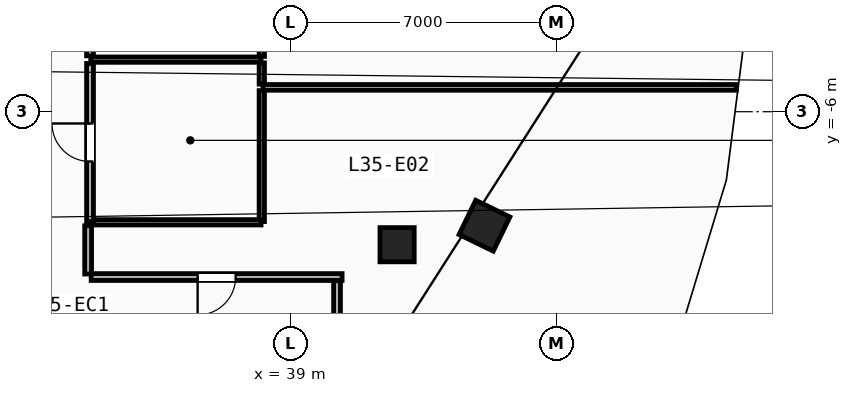
"""IFC4 building model, lengths in metres.
Left out: names, types, materials, properties, quantities, classifications, styles, units other than length and angle.
Written with IfcOpenShell. Run it as: python <this file> out.ifc"""

import sys

from ifc_helpers import new_model, si_unit, direction, frame, frame_2d, origin, origin_2d, place, context, subcontext, project, spatial, rectangle, extrude, element, fill, save


model = new_model("IFC4")
c1 = context("Model", 3, precision=1e-05, world=origin(), true_north=direction((0.0, 1.0)))
c2 = subcontext(c1, "Body", "Model", "MODEL_VIEW")
j1 = project(units=[si_unit("LENGTHUNIT", "METRE"), si_unit("PLANEANGLEUNIT", "RADIAN")], contexts=[c1])
p1 = place(None, origin())
s1 = spatial("IfcSite", under=j1, at=p1, CompositionType="ELEMENT")
p2 = place(p1, origin())
s2 = spatial("IfcBuilding", under=s1, at=p2, CompositionType="ELEMENT")
p3 = place(p2, frame((0.0, 0.0, 136.8)))
s3 = spatial("IfcBuildingStorey", under=s2, at=p3, CompositionType="ELEMENT", Elevation=136.8)
p4 = place(p3, frame((41.8, -9.5, 0.0), z_axis=(0.0, 0.0, 1.0), x_axis=(1.0, 0.0, 0.0)))
e1 = element("IfcColumn", 1, at=p4, inside=s3, PredefinedType="COLUMN", context=c2, shape_type="SweptSolid", body=[
    extrude(rectangle(XDim=0.9, YDim=0.9, at=origin_2d()), origin(), (0.0, 0.0, 1.0), 3.6),
])
p5 = place(p3, frame((44.1, -9.0, 0.0), z_axis=(0.0, 0.0, 1.0), x_axis=(0.437115766651, 0.899405251566, 0.0)))
e2 = element("IfcColumn", 2, at=p5, inside=s3, PredefinedType="COLUMN", context=c2, shape_type="SweptSolid", body=[
    extrude(rectangle(XDim=1.0, YDim=1.0, at=origin_2d()), origin(), (0.0, 0.0, 1.0), 3.6),
])
p6 = place(p3, frame((38.24, -8.89, 0.0), z_axis=(0.0, 0.0, 1.0), x_axis=(0.0, 1.0, 0.0)))
e3 = element("IfcWall", 3, at=p6, inside=s3, PredefinedType="PARTITIONING", context=c2, shape_type="SweptSolid", body=[
    extrude(rectangle(XDim=3.445, YDim=0.14, at=frame_2d((1.722, 0.0))), origin(), (0.0, 0.0, 1.0), 3.36),
])
p7 = place(p3, frame((38.24, -5.275, 0.0), z_axis=(0.0, 0.0, 1.0), x_axis=(0.0, 1.0, 0.0)))
e4 = element("IfcWall", 4, at=p7, inside=s3, PredefinedType="PARTITIONING", context=c2, shape_type="SweptSolid", body=[
    extrude(rectangle(XDim=0.56, YDim=0.14, at=frame_2d((0.28, 0.0))), origin(), (0.0, 0.0, 1.0), 3.36),
])
p8 = place(p3, frame((38.24, -4.545, 0.0), z_axis=(0.0, 0.0, 1.0), x_axis=(0.0, 1.0, 0.0)))
e5 = element("IfcWall", 5, at=p8, inside=s3, PredefinedType="PARTITIONING", context=c2, shape_type="SweptSolid", body=[
    extrude(rectangle(XDim=4.275, YDim=0.14, at=frame_2d((2.137, 0.0))), origin(), (0.0, 0.0, 1.0), 3.36),
])
for number, where, z_axis, x_axis in (
    (6, (33.74, -4.63, 0.0), (0.0, 0.0, 1.0), (1.0, 0.0, 0.0)),
    (7, (33.74, -8.91, 0.0), (0.0, 0.0, 1.0), (1.0, 0.0, 0.0)),
):
    element("IfcWall", number, at=place(p3, frame(where, z_axis=z_axis, x_axis=x_axis)), inside=s3, PredefinedType="PARTITIONING", context=c2, shape_type="SweptSolid", body=[
        extrude(rectangle(XDim=4.48, YDim=0.14, at=frame_2d((2.24, 0.0))), origin(), (0.0, 0.0, 1.0), 3.36),
    ])
p9 = place(p3, frame((33.72, -4.53, 0.0), z_axis=(0.0, 0.0, 1.0), x_axis=(0.0, 1.0, 0.0)))
e8 = element("IfcWall", 8, at=p9, inside=s3, PredefinedType="PARTITIONING", context=c2, shape_type="SweptSolid", body=[
    extrude(rectangle(XDim=4.26, YDim=0.18, at=frame_2d((2.13, 0.0))), origin(), (0.0, 0.0, 1.0), 3.36),
])
p10 = place(p9, frame((1.655, 0.0, 0.0)))
e9 = element("IfcOpeningElement", 9, at=p10, cuts=e8, PredefinedType="OPENING", context=c2, shape_type="SweptSolid", body=[
    extrude(rectangle(XDim=0.95, YDim=2.1, at=frame_2d((0.475, 1.05))), frame((0.0, 0.1, 0.0), z_axis=(0.0, -1.0, 0.0), x_axis=(1.0, 0.0, 0.0)), (0.0, 0.0, 1.0), 0.2),
])
p11 = place(p3, frame((33.72, -8.89, 0.0), z_axis=(0.0, 0.0, 1.0), x_axis=(0.0, 1.0, 0.0)))
e10 = element("IfcWall", 10, at=p11, inside=s3, PredefinedType="PARTITIONING", context=c2, shape_type="SweptSolid", body=[
    extrude(rectangle(XDim=4.16, YDim=0.18, at=frame_2d((2.08, 0.0))), origin(), (0.0, 0.0, 1.0), 3.36),
])
p12 = place(p11, frame((1.58, 0.0, 0.0)))
e11 = element("IfcOpeningElement", 11, at=p12, cuts=e10, PredefinedType="OPENING", context=c2, shape_type="SweptSolid", body=[
    extrude(rectangle(XDim=1.0, YDim=2.15, at=frame_2d((0.5, 1.075))), frame((0.0, 0.1, 0.0), z_axis=(0.0, -1.0, 0.0), x_axis=(1.0, 0.0, 0.0)), (0.0, 0.0, 1.0), 0.2),
])
p13 = place(p3, frame((38.27, -5.36, 0.0), z_axis=(0.0, 0.0, 1.0), x_axis=(1.0, 0.0, 0.0)))
e12 = element("IfcWall", 12, at=p13, inside=s3, PredefinedType="PARTITIONING", context=c2, shape_type="SweptSolid", body=[
    extrude(rectangle(XDim=12.455, YDim=0.15, at=frame_2d((6.228, 0.0))), origin(), (0.0, 0.0, 1.0), 3.36),
])
p14 = place(p3, frame((40.22, -12.779, 0.0), z_axis=(0.0, 0.0, 1.0), x_axis=(0.0, 1.0, 0.0)))
e13 = element("IfcWall", 13, at=p14, inside=s3, PredefinedType="PARTITIONING", context=c2, shape_type="SweptSolid", body=[
    extrude(rectangle(XDim=2.329, YDim=0.18, at=frame_2d((1.164, 0.0))), origin(), (0.0, 0.0, 1.0), 3.36),
])
p15 = place(p3, frame((40.353, -10.35, 0.0), z_axis=(0.0, 0.0, 1.0), x_axis=(-1.0, 0.0, 0.0)))
e14 = element("IfcWall", 14, at=p15, inside=s3, PredefinedType="PARTITIONING", context=c2, shape_type="SweptSolid", body=[
    extrude(rectangle(XDim=6.603, YDim=0.18, at=frame_2d((3.301, 0.0))), origin(), (0.0, 0.0, 1.0), 3.36),
])
p16 = place(p15, frame((2.802, 0.0, 0.0)))
e15 = element("IfcOpeningElement", 15, at=p16, cuts=e14, PredefinedType="OPENING", context=c2, shape_type="SweptSolid", body=[
    extrude(rectangle(XDim=1.0, YDim=2.15, at=frame_2d((0.5, 1.075))), frame((0.0, 0.1, 0.0), z_axis=(0.0, -1.0, 0.0), x_axis=(1.0, 0.0, 0.0)), (0.0, 0.0, 1.0), 0.2),
])
p17 = place(p3, frame((33.67, -10.27, 0.0), z_axis=(0.0, 0.0, 1.0), x_axis=(0.0, 1.0, 0.0)))
e16 = element("IfcWall", 16, at=p17, inside=s3, PredefinedType="PARTITIONING", context=c2, shape_type="SweptSolid", body=[
    extrude(rectangle(XDim=1.269, YDim=0.18, at=frame_2d((0.634, 0.0))), origin(), (0.0, 0.0, 1.0), 3.36),
])
p18 = place(p16, origin())
e17 = element("IfcDoor", 17, at=p18, inside=s3, OperationType="SINGLE_SWING_RIGHT", PredefinedType="DOOR", context=c2, shape_type="SweptSolid", body=[
    extrude(rectangle(XDim=1.0, YDim=2.15, at=frame_2d((0.5, 1.075))), frame((0.0, 0.025, 0.0), z_axis=(0.0, -1.0, 0.0), x_axis=(1.0, 0.0, 0.0)), (0.0, 0.0, 1.0), 0.05),
])
fill(e15, e17)
p19 = place(p12, origin())
e18 = element("IfcDoor", 18, at=p19, inside=s3, OperationType="SINGLE_SWING_RIGHT", PredefinedType="DOOR", context=c2, shape_type="SweptSolid", body=[
    extrude(rectangle(XDim=1.0, YDim=2.15, at=frame_2d((0.5, 1.075))), frame((0.0, 0.025, 0.0), z_axis=(0.0, -1.0, 0.0), x_axis=(1.0, 0.0, 0.0)), (0.0, 0.0, 1.0), 0.05),
])
fill(e11, e18)
save(model, sys.argv[1])
